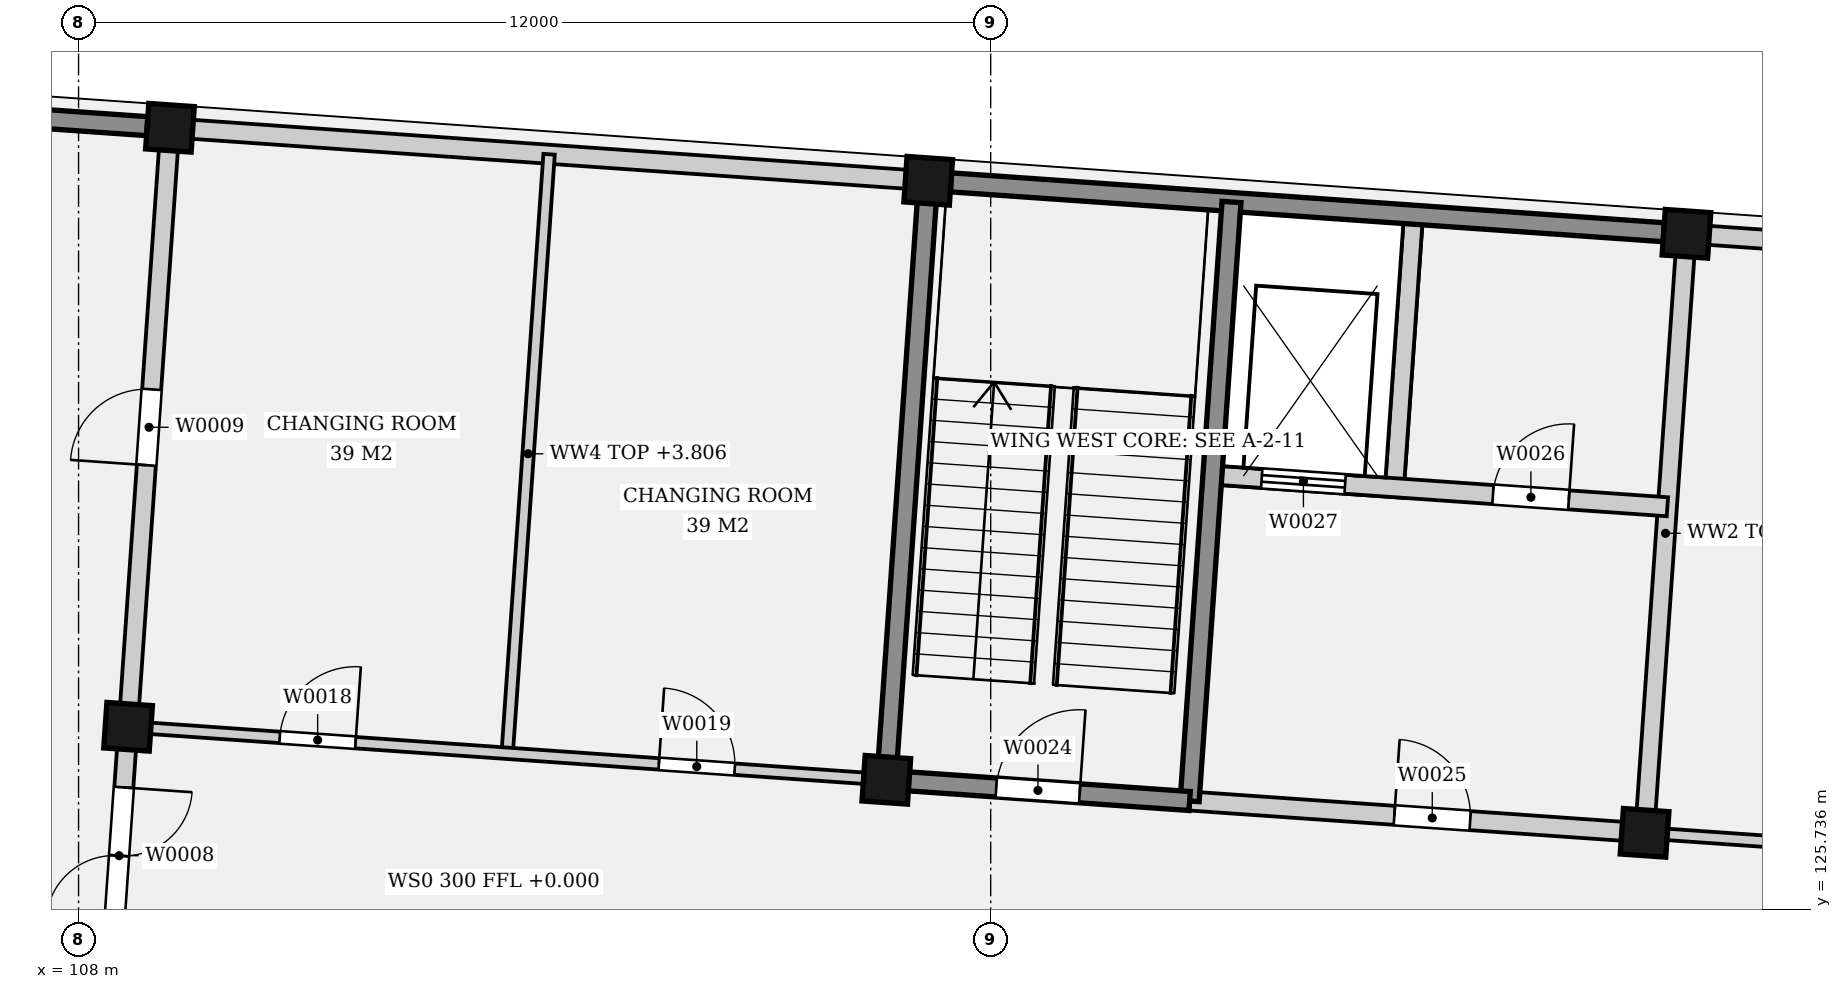
"""IFC4 building model, lengths in metres.
Left out: names, types, materials, properties, quantities, classifications, styles, units other than length and angle.
Written with IfcOpenShell. Run it as: python <this file> out.ifc"""

import sys

from ifc_helpers import new_model, si_unit, direction, frame, frame_2d, origin, origin_2d, place, context, subcontext, project, spatial, polyline, rectangle, outline, extrude, element, fill, save


model = new_model("IFC4")
c1 = context("Model", 3, precision=1e-05, world=origin(), true_north=direction((0.0, 1.0)))
c2 = subcontext(c1, "Body", "Model", "MODEL_VIEW")
j1 = project(units=[si_unit("LENGTHUNIT", "METRE"), si_unit("PLANEANGLEUNIT", "RADIAN")], contexts=[c1])
p1 = place(None, origin())
s1 = spatial("IfcSite", under=j1, at=p1, CompositionType="ELEMENT")
p2 = place(p1, origin())
s2 = spatial("IfcBuilding", under=s1, at=p2, CompositionType="ELEMENT")
p3 = place(p2, origin())
s3 = spatial("IfcBuildingStorey", under=s2, at=p3, CompositionType="ELEMENT", Elevation=0.0)
for number, where, z_axis, x_axis in (
    (1, (108.652, 128.138, -0.3), (0.0, 0.0, 1.0), (0.998, -0.07, 0.0)),
    (2, (109.202, 136.018, -0.3), (0.0, 0.0, 1.0), (0.998, -0.07, 0.0)),
    (3, (118.627, 127.44, -0.3), (0.0, 0.0, 1.0), (0.998, -0.07, 0.0)),
    (4, (119.178, 135.321, -0.3), (0.0, 0.0, 1.0), (0.998, -0.07, 0.0)),
    (5, (128.603, 126.742, -0.3), (0.0, 0.0, 1.0), (0.998, -0.07, 0.0)),
    (6, (129.154, 134.623, -0.3), (0.0, 0.0, 1.0), (0.998, -0.07, 0.0)),
):
    element("IfcColumn", number, at=place(p3, frame(where, z_axis=z_axis, x_axis=x_axis)), inside=s3, PredefinedType="COLUMN", context=c2, shape_type="SweptSolid", body=[
        extrude(rectangle(XDim=0.6, YDim=0.6, at=origin_2d()), origin(), (0.0, 0.0, 1.0), 5.3),
    ])
p4 = place(p3, frame((102.469, 136.489, 0.0), z_axis=(0.0, 0.0, 1.0), x_axis=(0.997563842515, -0.069759444574, 0.0)))
e7 = element("IfcWall", 7, at=p4, inside=s3, PredefinedType="SOLIDWALL", context=c2, shape_type="SweptSolid", body=[
    extrude(rectangle(XDim=6.45, YDim=0.25, at=frame_2d((3.225, 0.0))), origin(), (0.0, 0.0, 1.0), 3.806),
])
p5 = place(p3, frame((109.502, 135.997, 0.0), z_axis=(0.0, 0.0, 1.0), x_axis=(0.997565530081, -0.069735308086, 0.0)))
e8 = element("IfcWall", 8, at=p5, inside=s3, PredefinedType="SOLIDWALL", context=c2, shape_type="SweptSolid", body=[
    extrude(rectangle(XDim=9.4, YDim=0.25, at=frame_2d((4.7, 0.0))), origin(), (0.0, 0.0, 1.0), 3.806),
])
p6 = place(p3, frame((119.478, 135.3, 0.0), z_axis=(0.0, 0.0, 1.0), x_axis=(0.997563596579, -0.069762961373, 0.0)))
e9 = element("IfcWall", 9, at=p6, inside=s3, PredefinedType="SOLIDWALL", context=c2, shape_type="SweptSolid", body=[
    extrude(rectangle(XDim=9.4, YDim=0.25, at=frame_2d((4.7, 0.0))), origin(), (0.0, 0.0, 1.0), 4.17),
])
p7 = place(p3, frame((129.453, 134.602, 0.0), z_axis=(0.0, 0.0, 1.0), x_axis=(0.997563596579, -0.069762961373, 0.0)))
e10 = element("IfcWall", 10, at=p7, inside=s3, PredefinedType="SOLIDWALL", context=c2, shape_type="SweptSolid", body=[
    extrude(rectangle(XDim=9.4, YDim=0.25, at=frame_2d((4.7, 0.0))), origin(), (0.0, 0.0, 1.0), 4.17),
])
p8 = place(p7, frame((4.2, 0.0, 0.0)))
e11 = element("IfcOpeningElement", 11, at=p8, cuts=e10, PredefinedType="OPENING", context=c2, shape_type="SweptSolid", body=[
    extrude(rectangle(XDim=1.0, YDim=2.1, at=frame_2d((0.5, 1.05))), frame((0.0, 0.135, 0.0), z_axis=(0.0, -1.0, 0.0), x_axis=(1.0, 0.0, 0.0)), (0.0, 0.0, 1.0), 0.27),
])
p9 = place(p7, frame((1.25, 0.0, 1.2)))
e12 = element("IfcOpeningElement", 12, at=p9, cuts=e10, PredefinedType="OPENING", context=c2, shape_type="SweptSolid", body=[
    extrude(rectangle(XDim=1.8, YDim=1.5, at=frame_2d((0.9, 0.75))), frame((0.0, 0.135, 0.0), z_axis=(0.0, -1.0, 0.0), x_axis=(1.0, 0.0, 0.0)), (0.0, 0.0, 1.0), 0.27),
])
p10 = place(p7, frame((6.35, 0.0, 1.2)))
e13 = element("IfcOpeningElement", 13, at=p10, cuts=e10, PredefinedType="OPENING", context=c2, shape_type="SweptSolid", body=[
    extrude(rectangle(XDim=1.8, YDim=1.5, at=frame_2d((0.9, 0.75))), frame((0.0, 0.135, 0.0), z_axis=(0.0, -1.0, 0.0), x_axis=(1.0, 0.0, 0.0)), (0.0, 0.0, 1.0), 0.27),
])
p11 = place(p3, frame((107.863, 116.865, 0.0), z_axis=(0.0, 0.0, 1.0), x_axis=(0.069745107516, 0.997564844999, 0.0)))
e14 = element("IfcWall", 14, at=p11, inside=s3, PredefinedType="SOLIDWALL", context=c2, shape_type="SweptSolid", body=[
    extrude(rectangle(XDim=19.2, YDim=0.25, at=frame_2d((9.6, 0.0))), origin(), (0.0, 0.0, 1.0), 3.806),
])
p12 = place(p11, frame((3.05, 0.0, 0.0)))
e15 = element("IfcOpeningElement", 15, at=p12, cuts=e14, PredefinedType="OPENING", context=c2, shape_type="SweptSolid", body=[
    extrude(rectangle(XDim=1.8, YDim=2.1, at=frame_2d((0.9, 1.05))), frame((0.0, 0.135, 0.0), z_axis=(0.0, -1.0, 0.0), x_axis=(1.0, 0.0, 0.0)), (0.0, 0.0, 1.0), 0.27),
])
p13 = place(p11, frame((8.7, 0.0, 0.0)))
e16 = element("IfcOpeningElement", 16, at=p13, cuts=e14, PredefinedType="OPENING", context=c2, shape_type="SweptSolid", body=[
    extrude(rectangle(XDim=1.8, YDim=2.1, at=frame_2d((0.9, 1.05))), frame((0.0, 0.135, 0.0), z_axis=(0.0, -1.0, 0.0), x_axis=(1.0, 0.0, 0.0)), (0.0, 0.0, 1.0), 0.27),
])
p14 = place(p11, frame((14.75, 0.0, 0.0)))
e17 = element("IfcOpeningElement", 17, at=p14, cuts=e14, PredefinedType="OPENING", context=c2, shape_type="SweptSolid", body=[
    extrude(rectangle(XDim=1.0, YDim=2.1, at=frame_2d((0.5, 1.05))), frame((0.0, 0.135, 0.0), z_axis=(0.0, -1.0, 0.0), x_axis=(1.0, 0.0, 0.0)), (0.0, 0.0, 1.0), 0.27),
])
p15 = place(p3, frame((113.639, 127.789, 0.0), z_axis=(0.0, 0.0, 1.0), x_axis=(0.069751320509, 0.997564410596, 0.0)))
e18 = element("IfcWall", 18, at=p15, inside=s3, PredefinedType="PARTITIONING", context=c2, shape_type="SweptSolid", body=[
    extrude(rectangle(XDim=7.9, YDim=0.15, at=frame_2d((3.95, 0.0))), origin(), (0.0, 0.0, 1.0), 3.806),
])
p16 = place(p3, frame((118.627, 127.44, 0.0), z_axis=(0.0, 0.0, 1.0), x_axis=(0.0697491702, 0.997564560947, 0.0)))
e19 = element("IfcWall", 19, at=p16, inside=s3, PredefinedType="SOLIDWALL", context=c2, shape_type="SweptSolid", body=[
    extrude(rectangle(XDim=7.9, YDim=0.25, at=frame_2d((3.95, 0.0))), origin(), (0.0, 0.0, 1.0), 3.806),
])
p17 = place(p3, frame((122.617, 127.161, 0.0), z_axis=(0.0, 0.0, 1.0), x_axis=(0.0697491702, 0.997564560947, 0.0)))
e20 = element("IfcWall", 20, at=p17, inside=s3, PredefinedType="SOLIDWALL", context=c2, shape_type="SweptSolid", body=[
    extrude(rectangle(XDim=7.9, YDim=0.25, at=frame_2d((3.95, 0.0))), origin(), (0.0, 0.0, 1.0), 4.17),
])
p18 = place(p3, frame((125.312, 131.283, 0.0), z_axis=(0.0, 0.0, 1.0), x_axis=(0.069719119461, 0.997566661623, 0.0)))
e21 = element("IfcWall", 21, at=p18, inside=s3, PredefinedType="SOLIDWALL", context=c2, shape_type="SweptSolid", body=[
    extrude(rectangle(XDim=3.6, YDim=0.25, at=frame_2d((1.8, 0.0))), origin(), (0.0, 0.0, 1.0), 4.17),
])
p19 = place(p3, frame((128.603, 126.742, 0.0), z_axis=(0.0, 0.0, 1.0), x_axis=(0.0697491702, 0.997564560947, 0.0)))
e22 = element("IfcWall", 22, at=p19, inside=s3, PredefinedType="SOLIDWALL", context=c2, shape_type="SweptSolid", body=[
    extrude(rectangle(XDim=7.9, YDim=0.25, at=frame_2d((3.95, 0.0))), origin(), (0.0, 0.0, 1.0), 4.17),
])
p20 = place(p3, frame((108.652, 128.138, 0.0), z_axis=(0.0, 0.0, 1.0), x_axis=(0.997562707158, -0.069775678342, 0.0)))
e23 = element("IfcWall", 23, at=p20, inside=s3, PredefinedType="PARTITIONING", context=c2, shape_type="SweptSolid", body=[
    extrude(rectangle(XDim=10.0, YDim=0.15, at=frame_2d((5.0, 0.0))), origin(), (0.0, 0.0, 1.0), 4.042),
])
p21 = place(p20, frame((2.0, 0.0, 0.0)))
e24 = element("IfcOpeningElement", 24, at=p21, cuts=e23, PredefinedType="OPENING", context=c2, shape_type="SweptSolid", body=[
    extrude(rectangle(XDim=1.0, YDim=2.1, at=frame_2d((0.5, 1.05))), frame((0.0, 0.085, 0.0), z_axis=(0.0, -1.0, 0.0), x_axis=(1.0, 0.0, 0.0)), (0.0, 0.0, 1.0), 0.17),
])
p22 = place(p20, frame((7.0, 0.0, 0.0)))
e25 = element("IfcOpeningElement", 25, at=p22, cuts=e23, PredefinedType="OPENING", context=c2, shape_type="SweptSolid", body=[
    extrude(rectangle(XDim=1.0, YDim=2.1, at=frame_2d((0.5, 1.05))), frame((0.0, 0.085, 0.0), z_axis=(0.0, -1.0, 0.0), x_axis=(1.0, 0.0, 0.0)), (0.0, 0.0, 1.0), 0.17),
])
p23 = place(p3, frame((118.627, 127.44, 0.0), z_axis=(0.0, 0.0, 1.0), x_axis=(0.997563556766, -0.069763530677, 0.0)))
e26 = element("IfcWall", 26, at=p23, inside=s3, PredefinedType="SOLIDWALL", context=c2, shape_type="SweptSolid", body=[
    extrude(rectangle(XDim=4.0, YDim=0.25, at=frame_2d((2.0, 0.0))), origin(), (0.0, 0.0, 1.0), 4.17),
])
p24 = place(p23, frame((1.45, 0.0, 0.0)))
e27 = element("IfcOpeningElement", 27, at=p24, cuts=e26, PredefinedType="OPENING", context=c2, shape_type="SweptSolid", body=[
    extrude(rectangle(XDim=1.1, YDim=2.1, at=frame_2d((0.55, 1.05))), frame((0.0, 0.135, 0.0), z_axis=(0.0, -1.0, 0.0), x_axis=(1.0, 0.0, 0.0)), (0.0, 0.0, 1.0), 0.27),
])
p25 = place(p3, frame((122.617, 127.161, 0.0), z_axis=(0.0, 0.0, 1.0), x_axis=(0.997564972454, -0.069743284499, 0.0)))
e28 = element("IfcWall", 28, at=p25, inside=s3, PredefinedType="SOLIDWALL", context=c2, shape_type="SweptSolid", body=[
    extrude(rectangle(XDim=6.0, YDim=0.25, at=frame_2d((3.0, 0.0))), origin(), (0.0, 0.0, 1.0), 4.17),
])
p26 = place(p25, frame((2.7, 0.0, 0.0)))
e29 = element("IfcOpeningElement", 29, at=p26, cuts=e28, PredefinedType="OPENING", context=c2, shape_type="SweptSolid", body=[
    extrude(rectangle(XDim=1.0, YDim=2.1, at=frame_2d((0.5, 1.05))), frame((0.0, 0.135, 0.0), z_axis=(0.0, -1.0, 0.0), x_axis=(1.0, 0.0, 0.0)), (0.0, 0.0, 1.0), 0.27),
])
p27 = place(p3, frame((128.603, 126.742, 0.0), z_axis=(0.0, 0.0, 1.0), x_axis=(0.997564406228, -0.069751382981, 0.0)))
e30 = element("IfcWall", 30, at=p27, inside=s3, PredefinedType="PARTITIONING", context=c2, shape_type="SweptSolid", body=[
    extrude(rectangle(XDim=10.0, YDim=0.15, at=frame_2d((5.0, 0.0))), origin(), (0.0, 0.0, 1.0), 4.17),
])
p28 = place(p27, frame((4.5, 0.0, 0.0)))
e31 = element("IfcOpeningElement", 31, at=p28, cuts=e30, PredefinedType="OPENING", context=c2, shape_type="SweptSolid", body=[
    extrude(rectangle(XDim=1.0, YDim=2.1, at=frame_2d((0.5, 1.05))), frame((0.0, 0.085, 0.0), z_axis=(0.0, -1.0, 0.0), x_axis=(1.0, 0.0, 0.0)), (0.0, 0.0, 1.0), 0.17),
])
p29 = place(p3, frame((122.917, 131.45, 0.0), z_axis=(0.0, 0.0, 1.0), x_axis=(0.997564972454, -0.069743284499, 0.0)))
e32 = element("IfcWall", 32, at=p29, inside=s3, PredefinedType="SOLIDWALL", context=c2, shape_type="SweptSolid", body=[
    extrude(rectangle(XDim=6.0, YDim=0.25, at=frame_2d((3.0, 0.0))), origin(), (0.0, 0.0, 1.0), 4.17),
])
p30 = place(p29, frame((3.7, 0.0, 0.0)))
e33 = element("IfcOpeningElement", 33, at=p30, cuts=e32, PredefinedType="OPENING", context=c2, shape_type="SweptSolid", body=[
    extrude(rectangle(XDim=1.0, YDim=2.1, at=frame_2d((0.5, 1.05))), frame((0.0, 0.135, 0.0), z_axis=(0.0, -1.0, 0.0), x_axis=(1.0, 0.0, 0.0)), (0.0, 0.0, 1.0), 0.27),
])
p31 = place(p29, frame((0.65, 0.0, 0.0)))
e34 = element("IfcOpeningElement", 34, at=p31, cuts=e32, PredefinedType="OPENING", context=c2, shape_type="SweptSolid", body=[
    extrude(rectangle(XDim=1.1, YDim=2.1, at=frame_2d((0.55, 1.05))), frame((0.0, 0.135, 0.0), z_axis=(0.0, -1.0, 0.0), x_axis=(1.0, 0.0, 0.0)), (0.0, 0.0, 1.0), 0.27),
])
p32 = place(p3, frame((0.0, 0.0, -1.4)))
e35 = element("IfcWall", 35, at=p32, inside=s3, PredefinedType="SOLIDWALL", context=c2, shape_type="SweptSolid", body=[
    extrude(outline(polyline([(122.784, 131.334), (125.427, 131.15), (125.696, 134.99), (123.052, 135.175), (122.784, 131.334)]), holes=[polyline([(123.051, 131.566), (125.196, 131.417), (125.429, 134.758), (123.284, 134.908), (123.051, 131.566)])]), origin(), (0.0, 0.0, 1.0), 1.4),
])
p33 = place(p13, origin())
e36 = element("IfcDoor", 36, at=p33, inside=s3, OperationType="DOUBLE_DOOR_SINGLE_SWING", PredefinedType="DOOR", context=c2, shape_type="SweptSolid", body=[
    extrude(rectangle(XDim=1.8, YDim=2.1, at=frame_2d((0.9, 1.05))), frame((0.0, 0.025, 0.0), z_axis=(0.0, -1.0, 0.0), x_axis=(1.0, 0.0, 0.0)), (0.0, 0.0, 1.0), 0.05),
])
fill(e16, e36)
p34 = place(p14, origin())
e37 = element("IfcDoor", 37, at=p34, inside=s3, OperationType="SINGLE_SWING_LEFT", PredefinedType="DOOR", context=c2, shape_type="SweptSolid", body=[
    extrude(rectangle(XDim=1.0, YDim=2.1, at=frame_2d((0.5, 1.05))), frame((0.0, 0.025, 0.0), z_axis=(0.0, -1.0, 0.0), x_axis=(1.0, 0.0, 0.0)), (0.0, 0.0, 1.0), 0.05),
])
fill(e17, e37)
p35 = place(p21, origin())
e38 = element("IfcDoor", 38, at=p35, inside=s3, OperationType="SINGLE_SWING_RIGHT", PredefinedType="DOOR", context=c2, shape_type="SweptSolid", body=[
    extrude(rectangle(XDim=1.0, YDim=2.1, at=frame_2d((0.5, 1.05))), frame((0.0, 0.025, 0.0), z_axis=(0.0, -1.0, 0.0), x_axis=(1.0, 0.0, 0.0)), (0.0, 0.0, 1.0), 0.05),
])
fill(e24, e38)
p36 = place(p22, origin())
e39 = element("IfcDoor", 39, at=p36, inside=s3, OperationType="SINGLE_SWING_LEFT", PredefinedType="DOOR", context=c2, shape_type="SweptSolid", body=[
    extrude(rectangle(XDim=1.0, YDim=2.1, at=frame_2d((0.5, 1.05))), frame((0.0, 0.025, 0.0), z_axis=(0.0, -1.0, 0.0), x_axis=(1.0, 0.0, 0.0)), (0.0, 0.0, 1.0), 0.05),
])
fill(e25, e39)
p37 = place(p24, origin())
e40 = element("IfcDoor", 40, at=p37, inside=s3, OperationType="SINGLE_SWING_RIGHT", PredefinedType="DOOR", context=c2, shape_type="SweptSolid", body=[
    extrude(rectangle(XDim=1.1, YDim=2.1, at=frame_2d((0.55, 1.05))), frame((0.0, 0.025, 0.0), z_axis=(0.0, -1.0, 0.0), x_axis=(1.0, 0.0, 0.0)), (0.0, 0.0, 1.0), 0.05),
])
fill(e27, e40)
p38 = place(p26, origin())
e41 = element("IfcDoor", 41, at=p38, inside=s3, OperationType="SINGLE_SWING_LEFT", PredefinedType="DOOR", context=c2, shape_type="SweptSolid", body=[
    extrude(rectangle(XDim=1.0, YDim=2.1, at=frame_2d((0.5, 1.05))), frame((0.0, 0.025, 0.0), z_axis=(0.0, -1.0, 0.0), x_axis=(1.0, 0.0, 0.0)), (0.0, 0.0, 1.0), 0.05),
])
fill(e29, e41)
p39 = place(p30, origin())
e42 = element("IfcDoor", 42, at=p39, inside=s3, OperationType="SINGLE_SWING_RIGHT", PredefinedType="DOOR", context=c2, shape_type="SweptSolid", body=[
    extrude(rectangle(XDim=1.0, YDim=2.1, at=frame_2d((0.5, 1.05))), frame((0.0, 0.025, 0.0), z_axis=(0.0, -1.0, 0.0), x_axis=(1.0, 0.0, 0.0)), (0.0, 0.0, 1.0), 0.05),
])
fill(e33, e42)
p40 = place(p31, origin())
e43 = element("IfcDoor", 43, at=p40, inside=s3, OperationType="SLIDING_TO_LEFT", PredefinedType="DOOR", context=c2, shape_type="SweptSolid", body=[
    extrude(rectangle(XDim=1.1, YDim=2.1, at=frame_2d((0.55, 1.05))), frame((0.0, 0.025, 0.0), z_axis=(0.0, -1.0, 0.0), x_axis=(1.0, 0.0, 0.0)), (0.0, 0.0, 1.0), 0.05),
])
fill(e34, e43)
save(model, sys.argv[1])
